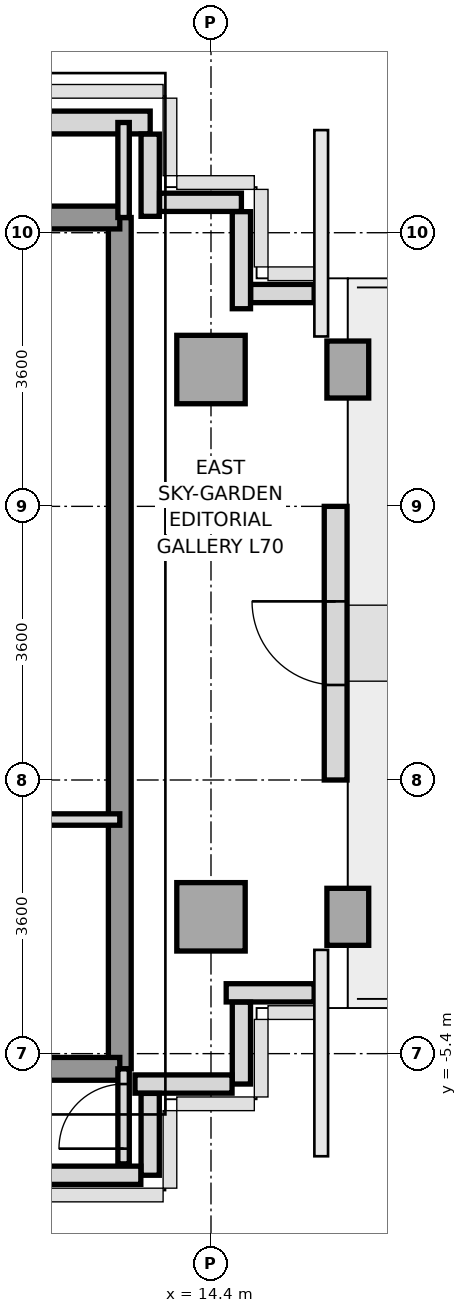
"""IFC4 building model, lengths in metres.
Left out: names, types, materials, properties, quantities, classifications, styles, units other than length and angle.
Written with IfcOpenShell. Run it as: python <this file> out.ifc"""

import sys

from ifc_helpers import new_model, si_unit, direction, frame, frame_2d, origin, origin_2d, place, context, subcontext, project, spatial, rectangle, extrude, source, transform, mapped, element, fill, save


model = new_model("IFC4")
c1 = context("Model", 3, precision=1e-05, world=origin(), true_north=direction((0.0, 1.0)))
c2 = subcontext(c1, "Body", "Model", "MODEL_VIEW")
j1 = project(units=[si_unit("LENGTHUNIT", "METRE"), si_unit("PLANEANGLEUNIT", "RADIAN")], contexts=[c1])
p1 = place(None, origin())
s1 = spatial("IfcSite", under=j1, at=p1, CompositionType="ELEMENT")
p2 = place(p1, origin())
s2 = spatial("IfcBuilding", under=s1, at=p2, CompositionType="ELEMENT")
p3 = place(p2, frame((0.0, 0.0, 252.4)))
s3 = spatial("IfcBuildingStorey", under=s2, at=p3, CompositionType="ELEMENT", Elevation=252.4)
m1 = source(origin(), c2, "Body", "SweptSolid", [
    extrude(rectangle(XDim=0.9, YDim=0.9, at=origin_2d()), origin(), (0.0, 0.0, 1.0), 3.01),
])
for number, where, z_axis, x_axis in (
    (1, (14.4, -3.6, 0.0), (0.0, 0.0, 1.0), (1.0, 0.0, 0.0)),
    (2, (14.4, 3.6, 0.0), (0.0, 0.0, 1.0), (1.0, 0.0, 0.0)),
):
    element("IfcColumn", number, at=place(p3, frame(where, z_axis=z_axis, x_axis=x_axis)), inside=s3, PredefinedType="COLUMN", context=c2, shape_type="MappedRepresentation", body=[
        mapped(m1, transform((0.0, 0.0, 0.0), x_axis=(1.0, 0.0, 0.0), y_axis=(0.0, 1.0, 0.0), z_axis=(0.0, 0.0, 1.0), scale=1.0)),
    ])
m2 = source(origin(), c2, "Body", "SweptSolid", [
    extrude(rectangle(XDim=0.55, YDim=0.75, at=origin_2d()), origin(), (0.0, 0.0, 1.0), 3.01),
])
for number, where, z_axis, x_axis in (
    (3, (16.2, -3.6, 0.0), (0.0, 0.0, 1.0), (1.0, 0.0, 0.0)),
    (4, (16.2, 3.6, 0.0), (0.0, 0.0, 1.0), (1.0, 0.0, 0.0)),
):
    element("IfcColumn", number, at=place(p3, frame(where, z_axis=z_axis, x_axis=x_axis)), inside=s3, PredefinedType="COLUMN", context=c2, shape_type="MappedRepresentation", body=[
        mapped(m2, transform((0.0, 0.0, 0.0), x_axis=(1.0, 0.0, 0.0), y_axis=(0.0, 1.0, 0.0), z_axis=(0.0, 0.0, 1.0), scale=1.0)),
    ])
p4 = place(p3, frame((11.448, 6.85, 0.0), z_axis=(0.0, 0.0, 1.0), x_axis=(1.0, 0.0, 0.0)))
e5 = element("IfcWall", 5, at=p4, inside=s3, PredefinedType="SOLIDWALL", context=c2, shape_type="SweptSolid", body=[
    extrude(rectangle(XDim=2.152, YDim=0.3, at=frame_2d((1.076, 0.0))), origin(), (0.0, 0.0, 1.0), 3.01),
])
p5 = place(p3, frame((16.04, -1.8, 0.0), z_axis=(0.0, 0.0, 1.0), x_axis=(0.0, 1.0, 0.0)))
e6 = element("IfcWall", 6, at=p5, inside=s3, PredefinedType="SOLIDWALL", context=c2, shape_type="SweptSolid", body=[
    extrude(rectangle(XDim=3.6, YDim=0.3, at=frame_2d((1.8, 0.0))), origin(), (0.0, 0.0, 1.0), 2.36),
])
p6 = place(p5, frame((1.25, 0.0, 0.0)))
e7 = element("IfcOpeningElement", 7, at=p6, cuts=e6, PredefinedType="OPENING", context=c2, shape_type="SweptSolid", body=[
    extrude(rectangle(XDim=1.1, YDim=2.3, at=frame_2d((0.55, 1.15))), frame((0.0, 0.16, 0.0), z_axis=(0.0, -1.0, 0.0), x_axis=(1.0, 0.0, 0.0)), (0.0, 0.0, 1.0), 0.32),
])
p7 = place(p3, frame((15.757, -4.6, 0.0), z_axis=(0.0, 0.0, 1.0), x_axis=(-1.0, 0.0, 0.0)))
e8 = element("IfcWall", 8, at=p7, inside=s3, PredefinedType="PARAPET", context=c2, shape_type="SweptSolid", body=[
    extrude(rectangle(XDim=1.157, YDim=0.24, at=frame_2d((0.579, 0.0))), origin(), (0.0, 0.0, 1.0), 1.15),
])
p8 = place(p3, frame((14.8, -4.723, 0.0), z_axis=(0.0, 0.0, 1.0), x_axis=(0.0, -1.0, 0.0)))
e9 = element("IfcWall", 9, at=p8, inside=s3, PredefinedType="PARAPET", context=c2, shape_type="SweptSolid", body=[
    extrude(rectangle(XDim=1.077, YDim=0.24, at=frame_2d((0.539, 0.0))), origin(), (0.0, 0.0, 1.0), 1.15),
])
p9 = place(p3, frame((14.677, -5.8, 0.0), z_axis=(0.0, 0.0, 1.0), x_axis=(-1.0, 0.0, 0.0)))
e10 = element("IfcWall", 10, at=p9, inside=s3, PredefinedType="PARAPET", context=c2, shape_type="SweptSolid", body=[
    extrude(rectangle(XDim=1.277, YDim=0.24, at=frame_2d((0.639, 0.0))), origin(), (0.0, 0.0, 1.0), 1.15),
])
p10 = place(p3, frame((13.6, -5.923, 0.0), z_axis=(0.0, 0.0, 1.0), x_axis=(0.0, -1.0, 0.0)))
e11 = element("IfcWall", 11, at=p10, inside=s3, PredefinedType="PARAPET", context=c2, shape_type="SweptSolid", body=[
    extrude(rectangle(XDim=1.077, YDim=0.24, at=frame_2d((0.539, 0.0))), origin(), (0.0, 0.0, 1.0), 1.15),
])
p11 = place(p3, frame((13.477, -7.0, 0.0), z_axis=(0.0, 0.0, 1.0), x_axis=(-1.0, 0.0, 0.0)))
e12 = element("IfcWall", 12, at=p11, inside=s3, PredefinedType="PARAPET", context=c2, shape_type="SweptSolid", body=[
    extrude(rectangle(XDim=4.199, YDim=0.24, at=frame_2d((2.1, 0.0))), origin(), (0.0, 0.0, 1.0), 1.15),
])
p12 = place(p3, frame((13.6, 6.697, 0.0), z_axis=(0.0, 0.0, 1.0), x_axis=(0.0, -1.0, 0.0)))
e13 = element("IfcWall", 13, at=p12, inside=s3, PredefinedType="PARAPET", context=c2, shape_type="SweptSolid", body=[
    extrude(rectangle(XDim=1.082, YDim=0.24, at=frame_2d((0.541, 0.0))), origin(), (0.0, 0.0, 1.0), 1.15),
])
p13 = place(p3, frame((13.723, 5.8, 0.0), z_axis=(0.0, 0.0, 1.0), x_axis=(1.0, 0.0, 0.0)))
e14 = element("IfcWall", 14, at=p13, inside=s3, PredefinedType="PARAPET", context=c2, shape_type="SweptSolid", body=[
    extrude(rectangle(XDim=1.077, YDim=0.24, at=frame_2d((0.539, 0.0))), origin(), (0.0, 0.0, 1.0), 1.15),
])
p14 = place(p3, frame((14.8, 5.677, 0.0), z_axis=(0.0, 0.0, 1.0), x_axis=(0.0, -1.0, 0.0)))
e15 = element("IfcWall", 15, at=p14, inside=s3, PredefinedType="PARAPET", context=c2, shape_type="SweptSolid", body=[
    extrude(rectangle(XDim=1.277, YDim=0.24, at=frame_2d((0.639, 0.0))), origin(), (0.0, 0.0, 1.0), 1.15),
])
p15 = place(p3, frame((14.923, 4.6, 0.0), z_axis=(0.0, 0.0, 1.0), x_axis=(1.0, 0.0, 0.0)))
e16 = element("IfcWall", 16, at=p15, inside=s3, PredefinedType="PARAPET", context=c2, shape_type="SweptSolid", body=[
    extrude(rectangle(XDim=0.834, YDim=0.24, at=frame_2d((0.417, 0.0))), origin(), (0.0, 0.0, 1.0), 1.15),
])
p16 = place(p3, frame((13.2, -5.6, 0.0), z_axis=(0.0, 0.0, 1.0), x_axis=(0.0, 1.0, 0.0)))
e17 = element("IfcWall", 17, at=p16, inside=s3, PredefinedType="SHEAR", context=c2, shape_type="SweptSolid", body=[
    extrude(rectangle(XDim=11.2, YDim=0.3, at=frame_2d((5.6, 0.0))), origin(), (0.0, 0.0, 1.0), 3.01),
])
p17 = place(p3, frame((11.356, 5.6, 0.0), z_axis=(0.0, 0.0, 1.0), x_axis=(1.0, 0.0, 0.0)))
e18 = element("IfcWall", 18, at=p17, inside=s3, PredefinedType="SHEAR", context=c2, shape_type="SweptSolid", body=[
    extrude(rectangle(XDim=1.844, YDim=0.3, at=frame_2d((0.922, 0.0))), origin(), (0.0, 0.0, 1.0), 3.01),
])
p18 = place(p3, frame((5.4, -5.6, 0.0), z_axis=(0.0, 0.0, 1.0), x_axis=(1.0, 0.0, 0.0)))
e19 = element("IfcWall", 19, at=p18, inside=s3, PredefinedType="SHEAR", context=c2, shape_type="SweptSolid", body=[
    extrude(rectangle(XDim=7.8, YDim=0.3, at=frame_2d((3.9, 0.0))), origin(), (0.0, 0.0, 1.0), 3.01),
])
p19 = place(p18, frame((5.85, 0.0, 0.0)))
e20 = element("IfcOpeningElement", 20, at=p19, cuts=e19, PredefinedType="OPENING", context=c2, shape_type="SweptSolid", body=[
    extrude(rectangle(XDim=0.8, YDim=2.1, at=frame_2d((0.4, 1.05))), frame((0.0, 0.16, 0.0), z_axis=(0.0, -1.0, 0.0), x_axis=(1.0, 0.0, 0.0)), (0.0, 0.0, 1.0), 0.32),
])
p20 = place(p18, frame((2.65, 0.0, 0.0)))
e21 = element("IfcOpeningElement", 21, at=p20, cuts=e19, PredefinedType="OPENING", context=c2, shape_type="SweptSolid", body=[
    extrude(rectangle(XDim=0.95, YDim=2.15, at=frame_2d((0.475, 1.075))), frame((0.0, 0.16, 0.0), z_axis=(0.0, -1.0, 0.0), x_axis=(1.0, 0.0, 0.0)), (0.0, 0.0, 1.0), 0.32),
])
p21 = place(p3, frame((11.02, -2.32, 0.0), z_axis=(0.0, 0.0, 1.0), x_axis=(1.0, 0.0, 0.0)))
e22 = element("IfcWall", 22, at=p21, inside=s3, PredefinedType="PARTITIONING", context=c2, shape_type="SweptSolid", body=[
    extrude(rectangle(XDim=2.18, YDim=0.15, at=frame_2d((1.09, 0.0))), origin(), (0.0, 0.0, 1.0), 3.01),
])
p22 = place(p3, frame((13.25, 5.6, 0.0), z_axis=(0.0, 0.0, 1.0), x_axis=(0.0, 1.0, 0.0)))
e23 = element("IfcWall", 23, at=p22, inside=s3, PredefinedType="PARTITIONING", context=c2, shape_type="SweptSolid", body=[
    extrude(rectangle(XDim=1.25, YDim=0.15, at=frame_2d((0.625, 0.0))), origin(), (0.0, 0.0, 1.0), 3.01),
])
p23 = place(p3, frame((13.25, -6.85, 0.0), z_axis=(0.0, 0.0, 1.0), x_axis=(0.0, 1.0, 0.0)))
e24 = element("IfcWall", 24, at=p23, inside=s3, PredefinedType="PARTITIONING", context=c2, shape_type="SweptSolid", body=[
    extrude(rectangle(XDim=1.25, YDim=0.15, at=frame_2d((0.625, 0.0))), origin(), (0.0, 0.0, 1.0), 3.01),
])
p24 = place(p23, frame((0.2, 0.0, 0.0)))
e25 = element("IfcOpeningElement", 25, at=p24, cuts=e24, PredefinedType="OPENING", context=c2, shape_type="SweptSolid", body=[
    extrude(rectangle(XDim=0.85, YDim=2.1, at=frame_2d((0.425, 1.05))), frame((0.0, 0.085, 0.0), z_axis=(0.0, -1.0, 0.0), x_axis=(1.0, 0.0, 0.0)), (0.0, 0.0, 1.0), 0.17),
])
m3 = source(origin(), c2, "Body", "SweptSolid", [
    extrude(rectangle(XDim=1.1, YDim=2.3, at=frame_2d((0.55, 1.15))), frame((0.0, 0.025, 0.0), z_axis=(0.0, -1.0, 0.0), x_axis=(1.0, 0.0, 0.0)), (0.0, 0.0, 1.0), 0.05),
])
p25 = place(p6, frame((1.1, 0.0, 0.0), z_axis=(0.0, 0.0, 1.0), x_axis=(-1.0, 0.0, 0.0)))
e26 = element("IfcDoor", 26, at=p25, inside=s3, OperationType="SINGLE_SWING_RIGHT", PredefinedType="DOOR", context=c2, shape_type="MappedRepresentation", body=[
    mapped(m3, transform((0.0, 0.0, 0.0), x_axis=(1.0, 0.0, 0.0), y_axis=(0.0, 1.0, 0.0), z_axis=(0.0, 0.0, 1.0), scale=1.0)),
])
fill(e7, e26)
m4 = source(origin(), c2, "Body", "SweptSolid", [
    extrude(rectangle(XDim=0.85, YDim=2.1, at=frame_2d((0.425, 1.05))), frame((0.0, 0.025, 0.0), z_axis=(0.0, -1.0, 0.0), x_axis=(1.0, 0.0, 0.0)), (0.0, 0.0, 1.0), 0.05),
])
p26 = place(p24, origin())
e27 = element("IfcDoor", 27, at=p26, inside=s3, OperationType="SINGLE_SWING_LEFT", PredefinedType="DOOR", context=c2, shape_type="MappedRepresentation", body=[
    mapped(m4, transform((0.0, 0.0, 0.0), x_axis=(1.0, 0.0, 0.0), y_axis=(0.0, 1.0, 0.0), z_axis=(0.0, 0.0, 1.0), scale=1.0)),
])
fill(e25, e27)
save(model, sys.argv[1])
